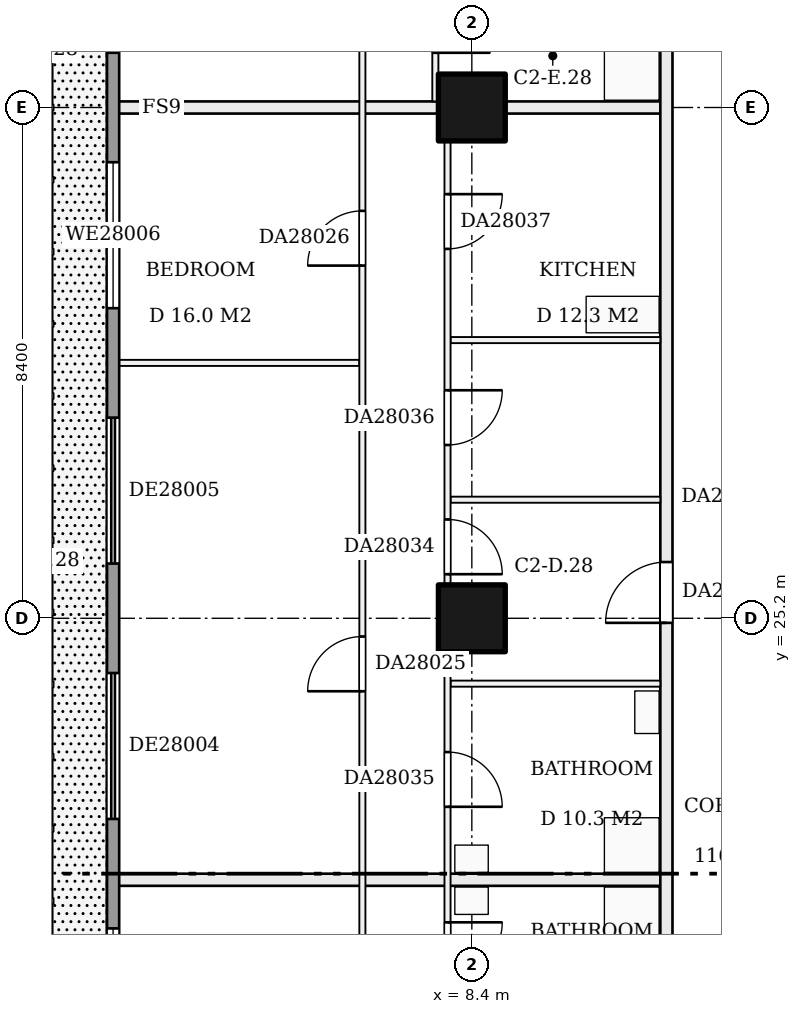
"""IFC4 building model, lengths in metres.
Left out: names, types, materials, properties, quantities, classifications, styles, units other than length and angle.
Written with IfcOpenShell. Run it as: python <this file> out.ifc"""

import sys

from ifc_helpers import new_model, si_unit, direction, frame, frame_2d, origin, origin_2d, place, context, subcontext, project, spatial, rectangle, extrude, element, fill, save


model = new_model("IFC4")
c1 = context("Model", 3, precision=1e-05, world=origin(), true_north=direction((0.0, 1.0)))
c2 = subcontext(c1, "Body", "Model", "MODEL_VIEW")
j1 = project(units=[si_unit("LENGTHUNIT", "METRE"), si_unit("PLANEANGLEUNIT", "RADIAN")], contexts=[c1])
p1 = place(None, origin())
s1 = spatial("IfcSite", under=j1, at=p1, CompositionType="ELEMENT")
p2 = place(p1, origin())
s2 = spatial("IfcBuilding", under=s1, at=p2, CompositionType="ELEMENT")
p3 = place(p2, frame((0.0, 0.0, 112.7)))
s3 = spatial("IfcBuildingStorey", under=s2, at=p3, CompositionType="ELEMENT", Elevation=112.7)
for number, where, z_axis, x_axis in (
    (1, (8.4, 25.2, 0.0), (0.0, 0.0, 1.0), (1.0, 0.0, 0.0)),
    (2, (8.4, 33.6, 0.0), (0.0, 0.0, 1.0), (1.0, 0.0, 0.0)),
):
    element("IfcColumn", number, at=place(p3, frame(where, z_axis=z_axis, x_axis=x_axis)), inside=s3, PredefinedType="COLUMN", context=c2, shape_type="SweptSolid", body=[
        extrude(rectangle(XDim=1.1, YDim=1.1, at=origin_2d()), origin(), (0.0, 0.0, 1.0), 3.22),
    ])
p4 = place(p3, frame((2.5, 20.9, 0.0), z_axis=(0.0, 0.0, 1.0), x_axis=(1.0, 0.0, 0.0)))
e3 = element("IfcWall", 3, at=p4, inside=s3, PredefinedType="PARTITIONING", context=c2, shape_type="SweptSolid", body=[
    extrude(rectangle(XDim=9.0, YDim=0.2, at=frame_2d((4.5, 0.0))), origin(), (0.0, 0.0, 1.0), 3.22),
])
for number, where, z_axis, x_axis in (
    (4, (8.05, 24.125, 0.0), (0.0, 0.0, 1.0), (1.0, 0.0, 0.0)),
    (5, (8.05, 27.15, 0.0), (0.0, 0.0, 1.0), (1.0, 0.0, 0.0)),
):
    element("IfcWall", number, at=place(p3, frame(where, z_axis=z_axis, x_axis=x_axis)), inside=s3, PredefinedType="PARTITIONING", context=c2, shape_type="SweptSolid", body=[
        extrude(rectangle(XDim=3.45, YDim=0.1, at=frame_2d((1.725, 0.0))), origin(), (0.0, 0.0, 1.0), 3.22),
    ])
p5 = place(p3, frame((2.5, 29.4, 0.0), z_axis=(0.0, 0.0, 1.0), x_axis=(1.0, 0.0, 0.0)))
e6 = element("IfcWall", 6, at=p5, inside=s3, PredefinedType="PARTITIONING", context=c2, shape_type="SweptSolid", body=[
    extrude(rectangle(XDim=4.05, YDim=0.1, at=frame_2d((2.025, 0.0))), origin(), (0.0, 0.0, 1.0), 3.22),
])
p6 = place(p3, frame((8.05, 29.775, 0.0), z_axis=(0.0, 0.0, 1.0), x_axis=(1.0, 0.0, 0.0)))
e7 = element("IfcWall", 7, at=p6, inside=s3, PredefinedType="PARTITIONING", context=c2, shape_type="SweptSolid", body=[
    extrude(rectangle(XDim=3.45, YDim=0.1, at=frame_2d((1.725, 0.0))), origin(), (0.0, 0.0, 1.0), 3.22),
])
p7 = place(p3, frame((2.5, 33.6, 0.0), z_axis=(0.0, 0.0, 1.0), x_axis=(1.0, 0.0, 0.0)))
e8 = element("IfcWall", 8, at=p7, inside=s3, PredefinedType="PARTITIONING", context=c2, shape_type="SweptSolid", body=[
    extrude(rectangle(XDim=9.0, YDim=0.2, at=frame_2d((4.5, 0.0))), origin(), (0.0, 0.0, 1.0), 3.22),
])
p8 = place(p3, frame((6.6, 16.85, 0.0), z_axis=(0.0, 0.0, 1.0), x_axis=(0.0, 1.0, 0.0)))
e9 = element("IfcWall", 9, at=p8, inside=s3, PredefinedType="PARTITIONING", context=c2, shape_type="SweptSolid", body=[
    extrude(rectangle(XDim=25.05, YDim=0.1, at=frame_2d((12.525, 0.0))), origin(), (0.0, 0.0, 1.0), 3.22),
])
p9 = place(p8, frame((1.55, 0.0, 0.0)))
e10 = element("IfcOpeningElement", 10, at=p9, cuts=e9, PredefinedType="OPENING", context=c2, shape_type="SweptSolid", body=[
    extrude(rectangle(XDim=0.9, YDim=2.1, at=frame_2d((0.45, 1.05))), frame((0.0, 0.06, 0.0), z_axis=(0.0, -1.0, 0.0), x_axis=(1.0, 0.0, 0.0)), (0.0, 0.0, 1.0), 0.12),
])
p10 = place(p8, frame((7.15, 0.0, 0.0)))
e11 = element("IfcOpeningElement", 11, at=p10, cuts=e9, PredefinedType="OPENING", context=c2, shape_type="SweptSolid", body=[
    extrude(rectangle(XDim=0.9, YDim=2.1, at=frame_2d((0.45, 1.05))), frame((0.0, 0.06, 0.0), z_axis=(0.0, -1.0, 0.0), x_axis=(1.0, 0.0, 0.0)), (0.0, 0.0, 1.0), 0.12),
])
p11 = place(p8, frame((14.15, 0.0, 0.0)))
e12 = element("IfcOpeningElement", 12, at=p11, cuts=e9, PredefinedType="OPENING", context=c2, shape_type="SweptSolid", body=[
    extrude(rectangle(XDim=0.9, YDim=2.1, at=frame_2d((0.45, 1.05))), frame((0.0, 0.06, 0.0), z_axis=(0.0, -1.0, 0.0), x_axis=(1.0, 0.0, 0.0)), (0.0, 0.0, 1.0), 0.12),
])
p12 = place(p8, frame((18.35, 0.0, 0.0)))
e13 = element("IfcOpeningElement", 13, at=p12, cuts=e9, PredefinedType="OPENING", context=c2, shape_type="SweptSolid", body=[
    extrude(rectangle(XDim=0.9, YDim=2.1, at=frame_2d((0.45, 1.05))), frame((0.0, 0.06, 0.0), z_axis=(0.0, -1.0, 0.0), x_axis=(1.0, 0.0, 0.0)), (0.0, 0.0, 1.0), 0.12),
])
p13 = place(p8, frame((22.55, 0.0, 0.0)))
e14 = element("IfcOpeningElement", 14, at=p13, cuts=e9, PredefinedType="OPENING", context=c2, shape_type="SweptSolid", body=[
    extrude(rectangle(XDim=0.9, YDim=2.1, at=frame_2d((0.45, 1.05))), frame((0.0, 0.06, 0.0), z_axis=(0.0, -1.0, 0.0), x_axis=(1.0, 0.0, 0.0)), (0.0, 0.0, 1.0), 0.12),
])
p14 = place(p3, frame((7.8, 33.7, 0.0), z_axis=(0.0, 0.0, 1.0), x_axis=(0.0, 1.0, 0.0)))
e15 = element("IfcWall", 15, at=p14, inside=s3, PredefinedType="PARTITIONING", context=c2, shape_type="SweptSolid", body=[
    extrude(rectangle(XDim=8.2, YDim=0.1, at=frame_2d((4.1, 0.0))), origin(), (0.0, 0.0, 1.0), 3.22),
])
p15 = place(p14, frame((6.633, 0.0, 0.0)))
e16 = element("IfcOpeningElement", 16, at=p15, cuts=e15, PredefinedType="OPENING", context=c2, shape_type="SweptSolid", body=[
    extrude(rectangle(XDim=0.9, YDim=2.1, at=frame_2d((0.45, 1.05))), frame((0.0, 0.06, 0.0), z_axis=(0.0, -1.0, 0.0), x_axis=(1.0, 0.0, 0.0)), (0.0, 0.0, 1.0), 0.12),
])
p16 = place(p14, frame((0.8, 0.0, 0.0)))
e17 = element("IfcOpeningElement", 17, at=p16, cuts=e15, PredefinedType="OPENING", context=c2, shape_type="SweptSolid", body=[
    extrude(rectangle(XDim=0.9, YDim=2.1, at=frame_2d((0.45, 1.05))), frame((0.0, 0.06, 0.0), z_axis=(0.0, -1.0, 0.0), x_axis=(1.0, 0.0, 0.0)), (0.0, 0.0, 1.0), 0.12),
])
p17 = place(p14, frame((3.767, 0.0, 0.0)))
e18 = element("IfcOpeningElement", 18, at=p17, cuts=e15, PredefinedType="OPENING", context=c2, shape_type="SweptSolid", body=[
    extrude(rectangle(XDim=0.9, YDim=2.1, at=frame_2d((0.45, 1.05))), frame((0.0, 0.06, 0.0), z_axis=(0.0, -1.0, 0.0), x_axis=(1.0, 0.0, 0.0)), (0.0, 0.0, 1.0), 0.12),
])
p18 = place(p3, frame((8.0, 16.85, 0.0), z_axis=(0.0, 0.0, 1.0), x_axis=(0.0, 1.0, 0.0)))
e19 = element("IfcWall", 19, at=p18, inside=s3, PredefinedType="PARTITIONING", context=c2, shape_type="SweptSolid", body=[
    extrude(rectangle(XDim=16.65, YDim=0.1, at=frame_2d((8.325, 0.0))), origin(), (0.0, 0.0, 1.0), 3.22),
])
p19 = place(p18, frame((0.75, 0.0, 0.0)))
e20 = element("IfcOpeningElement", 20, at=p19, cuts=e19, PredefinedType="OPENING", context=c2, shape_type="SweptSolid", body=[
    extrude(rectangle(XDim=0.9, YDim=2.1, at=frame_2d((0.45, 1.05))), frame((0.0, 0.06, 0.0), z_axis=(0.0, -1.0, 0.0), x_axis=(1.0, 0.0, 0.0)), (0.0, 0.0, 1.0), 0.12),
])
p20 = place(p18, frame((2.45, 0.0, 0.0)))
e21 = element("IfcOpeningElement", 21, at=p20, cuts=e19, PredefinedType="OPENING", context=c2, shape_type="SweptSolid", body=[
    extrude(rectangle(XDim=0.9, YDim=2.1, at=frame_2d((0.45, 1.05))), frame((0.0, 0.06, 0.0), z_axis=(0.0, -1.0, 0.0), x_axis=(1.0, 0.0, 0.0)), (0.0, 0.0, 1.0), 0.12),
])
p21 = place(p18, frame((9.075, 0.0, 0.0)))
e22 = element("IfcOpeningElement", 22, at=p21, cuts=e19, PredefinedType="OPENING", context=c2, shape_type="SweptSolid", body=[
    extrude(rectangle(XDim=0.9, YDim=2.1, at=frame_2d((0.45, 1.05))), frame((0.0, 0.06, 0.0), z_axis=(0.0, -1.0, 0.0), x_axis=(1.0, 0.0, 0.0)), (0.0, 0.0, 1.0), 0.12),
])
p22 = place(p18, frame((5.25, 0.0, 0.0)))
e23 = element("IfcOpeningElement", 23, at=p22, cuts=e19, PredefinedType="OPENING", context=c2, shape_type="SweptSolid", body=[
    extrude(rectangle(XDim=0.9, YDim=2.1, at=frame_2d((0.45, 1.05))), frame((0.0, 0.06, 0.0), z_axis=(0.0, -1.0, 0.0), x_axis=(1.0, 0.0, 0.0)), (0.0, 0.0, 1.0), 0.12),
])
p23 = place(p18, frame((11.2, 0.0, 0.0)))
e24 = element("IfcOpeningElement", 24, at=p23, cuts=e19, PredefinedType="OPENING", context=c2, shape_type="SweptSolid", body=[
    extrude(rectangle(XDim=0.9, YDim=2.1, at=frame_2d((0.45, 1.05))), frame((0.0, 0.06, 0.0), z_axis=(0.0, -1.0, 0.0), x_axis=(1.0, 0.0, 0.0)), (0.0, 0.0, 1.0), 0.12),
])
p24 = place(p18, frame((14.425, 0.0, 0.0)))
e25 = element("IfcOpeningElement", 25, at=p24, cuts=e19, PredefinedType="OPENING", context=c2, shape_type="SweptSolid", body=[
    extrude(rectangle(XDim=0.9, YDim=2.1, at=frame_2d((0.45, 1.05))), frame((0.0, 0.06, 0.0), z_axis=(0.0, -1.0, 0.0), x_axis=(1.0, 0.0, 0.0)), (0.0, 0.0, 1.0), 0.12),
])
p25 = place(p3, frame((11.6, 10.9, 0.0), z_axis=(0.0, 0.0, 1.0), x_axis=(0.0, 1.0, 0.0)))
e26 = element("IfcWall", 26, at=p25, inside=s3, PredefinedType="PARTITIONING", context=c2, shape_type="SweptSolid", body=[
    extrude(rectangle(XDim=31.1, YDim=0.2, at=frame_2d((15.55, 0.0))), origin(), (0.0, 0.0, 1.0), 3.22),
])
p26 = place(p25, frame((6.3, 0.0, 0.0)))
e27 = element("IfcOpeningElement", 27, at=p26, cuts=e26, PredefinedType="OPENING", context=c2, shape_type="SweptSolid", body=[
    extrude(rectangle(XDim=1.0, YDim=2.1, at=frame_2d((0.5, 1.05))), frame((0.0, 0.11, 0.0), z_axis=(0.0, -1.0, 0.0), x_axis=(1.0, 0.0, 0.0)), (0.0, 0.0, 1.0), 0.22),
])
p27 = place(p25, frame((14.225, 0.0, 0.0)))
e28 = element("IfcOpeningElement", 28, at=p27, cuts=e26, PredefinedType="OPENING", context=c2, shape_type="SweptSolid", body=[
    extrude(rectangle(XDim=1.0, YDim=2.1, at=frame_2d((0.5, 1.05))), frame((0.0, 0.11, 0.0), z_axis=(0.0, -1.0, 0.0), x_axis=(1.0, 0.0, 0.0)), (0.0, 0.0, 1.0), 0.22),
])
p28 = place(p25, frame((29.333, 0.0, 0.0)))
e29 = element("IfcOpeningElement", 29, at=p28, cuts=e26, PredefinedType="OPENING", context=c2, shape_type="SweptSolid", body=[
    extrude(rectangle(XDim=1.0, YDim=2.1, at=frame_2d((0.5, 1.05))), frame((0.0, 0.11, 0.0), z_axis=(0.0, -1.0, 0.0), x_axis=(1.0, 0.0, 0.0)), (0.0, 0.0, 1.0), 0.22),
])
p29 = place(p3, frame((2.5, 53.8, 0.0), z_axis=(0.0, 0.0, 1.0), x_axis=(0.0, -1.0, 0.0)))
e30 = element("IfcWall", 30, at=p29, inside=s3, PredefinedType="SOLIDWALL", context=c2, shape_type="SweptSolid", body=[
    extrude(rectangle(XDim=40.4, YDim=0.2, at=frame_2d((20.2, 0.0))), origin(), (0.0, 0.0, 1.0), 3.22),
])
p30 = place(p29, frame((37.7, 0.0, 0.9)))
e31 = element("IfcOpeningElement", 31, at=p30, cuts=e30, PredefinedType="OPENING", context=c2, shape_type="SweptSolid", body=[
    extrude(rectangle(XDim=2.4, YDim=1.5, at=frame_2d((1.2, 0.75))), frame((0.0, 0.11, 0.0), z_axis=(0.0, -1.0, 0.0), x_axis=(1.0, 0.0, 0.0)), (0.0, 0.0, 1.0), 0.22),
])
p31 = place(p29, frame((33.7, 0.0, 0.9)))
e32 = element("IfcOpeningElement", 32, at=p31, cuts=e30, PredefinedType="OPENING", context=c2, shape_type="SweptSolid", body=[
    extrude(rectangle(XDim=2.4, YDim=1.5, at=frame_2d((1.2, 0.75))), frame((0.0, 0.11, 0.0), z_axis=(0.0, -1.0, 0.0), x_axis=(1.0, 0.0, 0.0)), (0.0, 0.0, 1.0), 0.22),
])
p32 = place(p29, frame((29.5, 0.0, 0.0)))
e33 = element("IfcOpeningElement", 33, at=p32, cuts=e30, PredefinedType="OPENING", context=c2, shape_type="SweptSolid", body=[
    extrude(rectangle(XDim=2.4, YDim=2.2, at=frame_2d((1.2, 1.1))), frame((0.0, 0.11, 0.0), z_axis=(0.0, -1.0, 0.0), x_axis=(1.0, 0.0, 0.0)), (0.0, 0.0, 1.0), 0.22),
])
p33 = place(p29, frame((25.3, 0.0, 0.0)))
e34 = element("IfcOpeningElement", 34, at=p33, cuts=e30, PredefinedType="OPENING", context=c2, shape_type="SweptSolid", body=[
    extrude(rectangle(XDim=2.4, YDim=2.2, at=frame_2d((1.2, 1.1))), frame((0.0, 0.11, 0.0), z_axis=(0.0, -1.0, 0.0), x_axis=(1.0, 0.0, 0.0)), (0.0, 0.0, 1.0), 0.22),
])
p34 = place(p29, frame((21.1, 0.0, 0.9)))
e35 = element("IfcOpeningElement", 35, at=p34, cuts=e30, PredefinedType="OPENING", context=c2, shape_type="SweptSolid", body=[
    extrude(rectangle(XDim=2.4, YDim=1.5, at=frame_2d((1.2, 0.75))), frame((0.0, 0.11, 0.0), z_axis=(0.0, -1.0, 0.0), x_axis=(1.0, 0.0, 0.0)), (0.0, 0.0, 1.0), 0.22),
])
p35 = place(p29, frame((16.9, 0.0, 0.0)))
e36 = element("IfcOpeningElement", 36, at=p35, cuts=e30, PredefinedType="OPENING", context=c2, shape_type="SweptSolid", body=[
    extrude(rectangle(XDim=2.4, YDim=2.2, at=frame_2d((1.2, 1.1))), frame((0.0, 0.11, 0.0), z_axis=(0.0, -1.0, 0.0), x_axis=(1.0, 0.0, 0.0)), (0.0, 0.0, 1.0), 0.22),
])
p36 = place(p29, frame((12.7, 0.0, 0.9)))
e37 = element("IfcOpeningElement", 37, at=p36, cuts=e30, PredefinedType="OPENING", context=c2, shape_type="SweptSolid", body=[
    extrude(rectangle(XDim=2.4, YDim=1.5, at=frame_2d((1.2, 0.75))), frame((0.0, 0.11, 0.0), z_axis=(0.0, -1.0, 0.0), x_axis=(1.0, 0.0, 0.0)), (0.0, 0.0, 1.0), 0.22),
])
p37 = place(p29, frame((8.5, 0.0, 0.9)))
e38 = element("IfcOpeningElement", 38, at=p37, cuts=e30, PredefinedType="OPENING", context=c2, shape_type="SweptSolid", body=[
    extrude(rectangle(XDim=2.4, YDim=1.5, at=frame_2d((1.2, 0.75))), frame((0.0, 0.11, 0.0), z_axis=(0.0, -1.0, 0.0), x_axis=(1.0, 0.0, 0.0)), (0.0, 0.0, 1.0), 0.22),
])
p38 = place(p29, frame((4.3, 0.0, 0.9)))
e39 = element("IfcOpeningElement", 39, at=p38, cuts=e30, PredefinedType="OPENING", context=c2, shape_type="SweptSolid", body=[
    extrude(rectangle(XDim=2.4, YDim=1.5, at=frame_2d((1.2, 0.75))), frame((0.0, 0.11, 0.0), z_axis=(0.0, -1.0, 0.0), x_axis=(1.0, 0.0, 0.0)), (0.0, 0.0, 1.0), 0.22),
])
p39 = place(p29, frame((0.3, 0.0, 0.0)))
e40 = element("IfcOpeningElement", 40, at=p39, cuts=e30, PredefinedType="OPENING", context=c2, shape_type="SweptSolid", body=[
    extrude(rectangle(XDim=2.4, YDim=2.2, at=frame_2d((1.2, 1.1))), frame((0.0, 0.11, 0.0), z_axis=(0.0, -1.0, 0.0), x_axis=(1.0, 0.0, 0.0)), (0.0, 0.0, 1.0), 0.22),
])
p40 = place(p10, origin())
e41 = element("IfcDoor", 41, at=p40, inside=s3, OperationType="SINGLE_SWING_LEFT", PredefinedType="DOOR", context=c2, shape_type="SweptSolid", body=[
    extrude(rectangle(XDim=0.9, YDim=2.1, at=frame_2d((0.45, 1.05))), frame((0.0, 0.025, 0.0), z_axis=(0.0, -1.0, 0.0), x_axis=(1.0, 0.0, 0.0)), (0.0, 0.0, 1.0), 0.05),
])
fill(e11, e41)
p41 = place(p11, origin())
e42 = element("IfcDoor", 42, at=p41, inside=s3, OperationType="SINGLE_SWING_LEFT", PredefinedType="DOOR", context=c2, shape_type="SweptSolid", body=[
    extrude(rectangle(XDim=0.9, YDim=2.1, at=frame_2d((0.45, 1.05))), frame((0.0, 0.025, 0.0), z_axis=(0.0, -1.0, 0.0), x_axis=(1.0, 0.0, 0.0)), (0.0, 0.0, 1.0), 0.05),
])
fill(e12, e42)
p42 = place(p20, frame((0.9, 0.0, 0.0), z_axis=(0.0, 0.0, 1.0), x_axis=(-1.0, 0.0, 0.0)))
e43 = element("IfcDoor", 43, at=p42, inside=s3, OperationType="SINGLE_SWING_LEFT", PredefinedType="DOOR", context=c2, shape_type="SweptSolid", body=[
    extrude(rectangle(XDim=0.9, YDim=2.1, at=frame_2d((0.45, 1.05))), frame((0.0, 0.025, 0.0), z_axis=(0.0, -1.0, 0.0), x_axis=(1.0, 0.0, 0.0)), (0.0, 0.0, 1.0), 0.05),
])
fill(e21, e43)
p43 = place(p21, frame((0.9, 0.0, 0.0), z_axis=(0.0, 0.0, 1.0), x_axis=(-1.0, 0.0, 0.0)))
e44 = element("IfcDoor", 44, at=p43, inside=s3, OperationType="SINGLE_SWING_RIGHT", PredefinedType="DOOR", context=c2, shape_type="SweptSolid", body=[
    extrude(rectangle(XDim=0.9, YDim=2.1, at=frame_2d((0.45, 1.05))), frame((0.0, 0.025, 0.0), z_axis=(0.0, -1.0, 0.0), x_axis=(1.0, 0.0, 0.0)), (0.0, 0.0, 1.0), 0.05),
])
fill(e22, e44)
p44 = place(p22, frame((0.9, 0.0, 0.0), z_axis=(0.0, 0.0, 1.0), x_axis=(-1.0, 0.0, 0.0)))
e45 = element("IfcDoor", 45, at=p44, inside=s3, OperationType="SINGLE_SWING_RIGHT", PredefinedType="DOOR", context=c2, shape_type="SweptSolid", body=[
    extrude(rectangle(XDim=0.9, YDim=2.1, at=frame_2d((0.45, 1.05))), frame((0.0, 0.025, 0.0), z_axis=(0.0, -1.0, 0.0), x_axis=(1.0, 0.0, 0.0)), (0.0, 0.0, 1.0), 0.05),
])
fill(e23, e45)
p45 = place(p23, frame((0.9, 0.0, 0.0), z_axis=(0.0, 0.0, 1.0), x_axis=(-1.0, 0.0, 0.0)))
e46 = element("IfcDoor", 46, at=p45, inside=s3, OperationType="SINGLE_SWING_LEFT", PredefinedType="DOOR", context=c2, shape_type="SweptSolid", body=[
    extrude(rectangle(XDim=0.9, YDim=2.1, at=frame_2d((0.45, 1.05))), frame((0.0, 0.025, 0.0), z_axis=(0.0, -1.0, 0.0), x_axis=(1.0, 0.0, 0.0)), (0.0, 0.0, 1.0), 0.05),
])
fill(e24, e46)
p46 = place(p24, frame((0.9, 0.0, 0.0), z_axis=(0.0, 0.0, 1.0), x_axis=(-1.0, 0.0, 0.0)))
e47 = element("IfcDoor", 47, at=p46, inside=s3, OperationType="SINGLE_SWING_LEFT", PredefinedType="DOOR", context=c2, shape_type="SweptSolid", body=[
    extrude(rectangle(XDim=0.9, YDim=2.1, at=frame_2d((0.45, 1.05))), frame((0.0, 0.025, 0.0), z_axis=(0.0, -1.0, 0.0), x_axis=(1.0, 0.0, 0.0)), (0.0, 0.0, 1.0), 0.05),
])
fill(e25, e47)
p47 = place(p27, origin())
e48 = element("IfcDoor", 48, at=p47, inside=s3, OperationType="SINGLE_SWING_LEFT", PredefinedType="DOOR", context=c2, shape_type="SweptSolid", body=[
    extrude(rectangle(XDim=1.0, YDim=2.1, at=frame_2d((0.5, 1.05))), frame((0.0, 0.025, 0.0), z_axis=(0.0, -1.0, 0.0), x_axis=(1.0, 0.0, 0.0)), (0.0, 0.0, 1.0), 0.05),
])
fill(e28, e48)
p48 = place(p31, origin())
e49 = element("IfcWindow", 49, at=p48, inside=s3, PartitioningType="SINGLE_PANEL", PredefinedType="WINDOW", context=c2, shape_type="SweptSolid", body=[
    extrude(rectangle(XDim=2.4, YDim=1.5, at=frame_2d((1.2, 0.75))), frame((0.0, 0.03, 0.0), z_axis=(0.0, -1.0, 0.0), x_axis=(1.0, 0.0, 0.0)), (0.0, 0.0, 1.0), 0.06),
])
fill(e32, e49)
p49 = place(p32, origin())
e50 = element("IfcDoor", 50, at=p49, inside=s3, OperationType="DOUBLE_DOOR_SLIDING", PredefinedType="DOOR", context=c2, shape_type="SweptSolid", body=[
    extrude(rectangle(XDim=2.4, YDim=2.2, at=frame_2d((1.2, 1.1))), frame((0.0, 0.025, 0.0), z_axis=(0.0, -1.0, 0.0), x_axis=(1.0, 0.0, 0.0)), (0.0, 0.0, 1.0), 0.05),
])
fill(e33, e50)
p50 = place(p33, origin())
e51 = element("IfcDoor", 51, at=p50, inside=s3, OperationType="DOUBLE_DOOR_SLIDING", PredefinedType="DOOR", context=c2, shape_type="SweptSolid", body=[
    extrude(rectangle(XDim=2.4, YDim=2.2, at=frame_2d((1.2, 1.1))), frame((0.0, 0.025, 0.0), z_axis=(0.0, -1.0, 0.0), x_axis=(1.0, 0.0, 0.0)), (0.0, 0.0, 1.0), 0.05),
])
fill(e34, e51)
p51 = place(p34, origin())
e52 = element("IfcWindow", 52, at=p51, inside=s3, PartitioningType="SINGLE_PANEL", PredefinedType="WINDOW", context=c2, shape_type="SweptSolid", body=[
    extrude(rectangle(XDim=2.4, YDim=1.5, at=frame_2d((1.2, 0.75))), frame((0.0, 0.03, 0.0), z_axis=(0.0, -1.0, 0.0), x_axis=(1.0, 0.0, 0.0)), (0.0, 0.0, 1.0), 0.06),
])
fill(e35, e52)
save(model, sys.argv[1])
